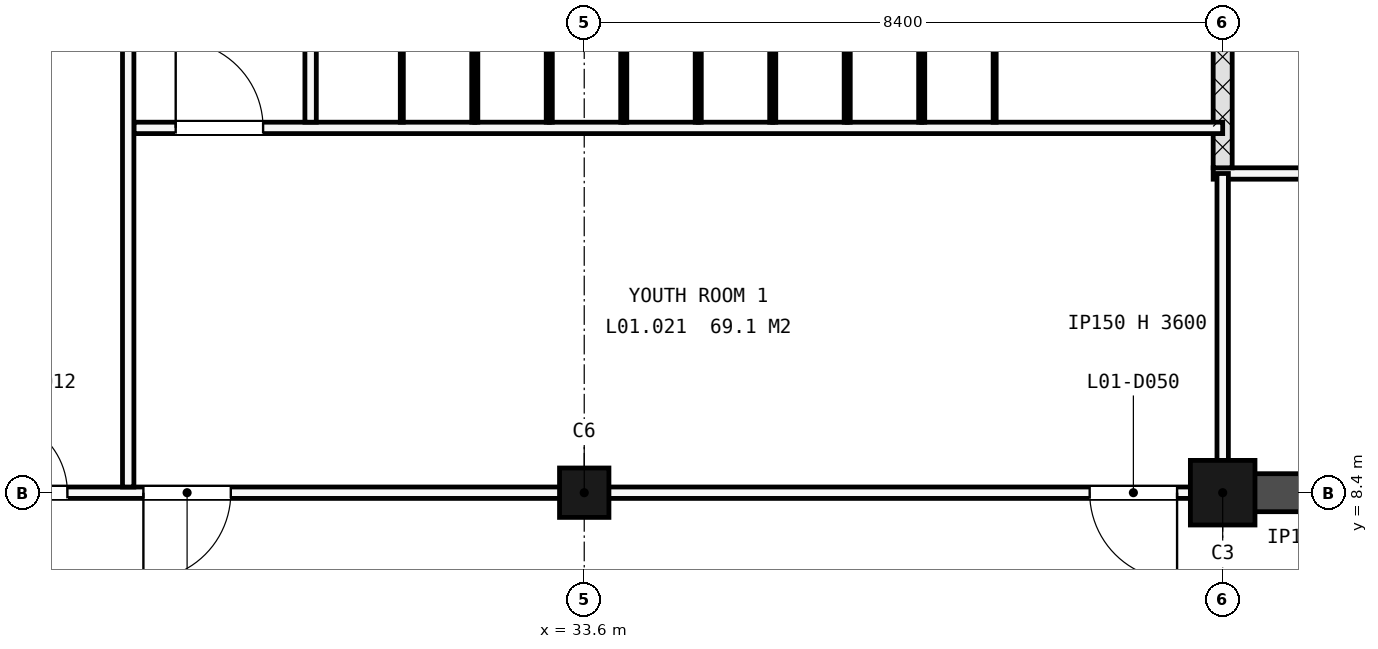
"""IFC4 building model, lengths in metres.
Left out: names, types, materials, properties, quantities, classifications, styles, units other than length and angle.
Written with IfcOpenShell. Run it as: python <this file> out.ifc"""

import sys

from ifc_helpers import new_model, si_unit, direction, frame, frame_2d, origin, origin_2d, place, context, subcontext, project, spatial, rectangle, extrude, element, fill, save


model = new_model("IFC4")
c1 = context("Model", 3, precision=1e-05, world=origin(), true_north=direction((0.0, 1.0)))
c2 = subcontext(c1, "Body", "Model", "MODEL_VIEW")
j1 = project(units=[si_unit("LENGTHUNIT", "METRE"), si_unit("PLANEANGLEUNIT", "RADIAN")], contexts=[c1])
p1 = place(None, origin())
s1 = spatial("IfcSite", under=j1, at=p1, CompositionType="ELEMENT")
p2 = place(p1, origin())
s2 = spatial("IfcBuilding", under=s1, at=p2, CompositionType="ELEMENT")
p3 = place(p2, frame((0.0, 0.0, 5.4)))
s3 = spatial("IfcBuildingStorey", under=s2, at=p3, CompositionType="ELEMENT", Elevation=5.4)
p4 = place(p3, frame((33.6, 8.4, -0.3), z_axis=(0.0, 0.0, 1.0), x_axis=(1.0, 0.0, 0.0)))
e1 = element("IfcColumn", 1, at=p4, inside=s3, PredefinedType="COLUMN", context=c2, shape_type="SweptSolid", body=[
    extrude(rectangle(XDim=0.65, YDim=0.65, at=origin_2d()), origin(), (0.0, 0.0, 1.0), 4.55),
])
p5 = place(p3, frame((42.0, 8.4, -0.3), z_axis=(0.0, 0.0, 1.0), x_axis=(1.0, 0.0, 0.0)))
e2 = element("IfcColumn", 2, at=p5, inside=s3, PredefinedType="COLUMN", context=c2, shape_type="SweptSolid", body=[
    extrude(rectangle(XDim=0.85, YDim=0.85, at=origin_2d()), origin(), (0.0, 0.0, 1.0), 4.55),
])
p6 = place(p3, frame((42.0, 8.4, -0.3), z_axis=(0.0, 0.0, 1.0), x_axis=(1.0, 0.0, 0.0)))
e3 = element("IfcWall", 3, at=p6, inside=s3, PredefinedType="SHEAR", context=c2, shape_type="SweptSolid", body=[
    extrude(rectangle(XDim=42.0, YDim=0.5, at=frame_2d((21.0, 0.0))), origin(), (0.0, 0.0, 1.0), 4.55),
])
p7 = place(p6, frame((20.6, 0.0, 0.3)))
e4 = element("IfcOpeningElement", 4, at=p7, cuts=e3, PredefinedType="OPENING", context=c2, shape_type="SweptSolid", body=[
    extrude(rectangle(XDim=1.0, YDim=2.1, at=frame_2d((0.5, 1.05))), frame((0.0, 0.26, 0.0), z_axis=(0.0, -1.0, 0.0), x_axis=(1.0, 0.0, 0.0)), (0.0, 0.0, 1.0), 0.52),
])
p8 = place(p3, frame((41.875, 12.6, -0.3), z_axis=(0.0, 0.0, 1.0), x_axis=(1.0, 0.0, 0.0)))
e5 = element("IfcWall", 5, at=p8, inside=s3, PredefinedType="PARTITIONING", context=c2, shape_type="SweptSolid", body=[
    extrude(rectangle(XDim=42.025, YDim=0.15, at=frame_2d((21.012, 0.0))), origin(), (0.0, 0.0, 1.0), 4.5),
])
p9 = place(p3, frame((42.0, 12.675, -0.3), z_axis=(0.0, 0.0, 1.0), x_axis=(0.0, 1.0, 0.0)))
e6 = element("IfcWall", 6, at=p9, inside=s3, PredefinedType="SOLIDWALL", context=c2, shape_type="SweptSolid", body=[
    extrude(rectangle(XDim=12.425, YDim=0.25, at=frame_2d((6.212, 0.0))), origin(), (0.0, 0.0, 1.0), 3.9),
])
p10 = place(p3, frame((25.2, 8.4, 0.0), z_axis=(0.0, 0.0, 1.0), x_axis=(1.0, 0.0, 0.0)))
e7 = element("IfcWall", 7, at=p10, inside=s3, PredefinedType="PARTITIONING", context=c2, shape_type="SweptSolid", body=[
    extrude(rectangle(XDim=16.875, YDim=0.15, at=frame_2d((8.438, 0.0))), origin(), (0.0, 0.0, 1.0), 3.5),
])
p11 = place(p10, frame((2.6, 0.0, 0.0)))
e8 = element("IfcOpeningElement", 8, at=p11, cuts=e7, PredefinedType="OPENING", context=c2, shape_type="SweptSolid", body=[
    extrude(rectangle(XDim=1.15, YDim=2.1, at=frame_2d((0.575, 1.05))), frame((0.0, 0.085, 0.0), z_axis=(0.0, -1.0, 0.0), x_axis=(1.0, 0.0, 0.0)), (0.0, 0.0, 1.0), 0.17),
])
p12 = place(p10, frame((15.05, 0.0, 0.0)))
e9 = element("IfcOpeningElement", 9, at=p12, cuts=e7, PredefinedType="OPENING", context=c2, shape_type="SweptSolid", body=[
    extrude(rectangle(XDim=1.15, YDim=2.1, at=frame_2d((0.575, 1.05))), frame((0.0, 0.085, 0.0), z_axis=(0.0, -1.0, 0.0), x_axis=(1.0, 0.0, 0.0)), (0.0, 0.0, 1.0), 0.17),
])
p13 = place(p10, frame((0.6, 0.0, 0.0)))
e10 = element("IfcOpeningElement", 10, at=p13, cuts=e7, PredefinedType="OPENING", context=c2, shape_type="SweptSolid", body=[
    extrude(rectangle(XDim=1.0, YDim=2.1, at=frame_2d((0.5, 1.05))), frame((0.0, 0.085, 0.0), z_axis=(0.0, -1.0, 0.0), x_axis=(1.0, 0.0, 0.0)), (0.0, 0.0, 1.0), 0.17),
])
p14 = place(p3, frame((27.675, 13.2, 0.0), z_axis=(0.0, 0.0, 1.0), x_axis=(1.0, 0.0, 0.0)))
e11 = element("IfcWall", 11, at=p14, inside=s3, PredefinedType="PARTITIONING", context=c2, shape_type="SweptSolid", body=[
    extrude(rectangle(XDim=14.325, YDim=0.15, at=frame_2d((7.163, 0.0))), origin(), (0.0, 0.0, 1.0), 4.2),
])
p15 = place(p14, frame((0.55, 0.0, 0.0)))
e12 = element("IfcOpeningElement", 12, at=p15, cuts=e11, PredefinedType="OPENING", context=c2, shape_type="SweptSolid", body=[
    extrude(rectangle(XDim=1.15, YDim=2.1, at=frame_2d((0.575, 1.05))), frame((0.0, 0.085, 0.0), z_axis=(0.0, -1.0, 0.0), x_axis=(1.0, 0.0, 0.0)), (0.0, 0.0, 1.0), 0.17),
])
p16 = place(p3, frame((27.6, 8.475, 0.0), z_axis=(0.0, 0.0, 1.0), x_axis=(0.0, 1.0, 0.0)))
e13 = element("IfcWall", 13, at=p16, inside=s3, PredefinedType="PARTITIONING", context=c2, shape_type="SweptSolid", body=[
    extrude(rectangle(XDim=16.825, YDim=0.15, at=frame_2d((8.413, 0.0))), origin(), (0.0, 0.0, 1.0), 4.2),
])
p17 = place(p16, frame((10.125, 0.0, 0.0)))
e14 = element("IfcOpeningElement", 14, at=p17, cuts=e13, PredefinedType="OPENING", context=c2, shape_type="SweptSolid", body=[
    extrude(rectangle(XDim=1.0, YDim=2.1, at=frame_2d((0.5, 1.05))), frame((0.0, 0.085, 0.0), z_axis=(0.0, -1.0, 0.0), x_axis=(1.0, 0.0, 0.0)), (0.0, 0.0, 1.0), 0.17),
])
p18 = place(p3, frame((30.0, 13.275, 0.0), z_axis=(0.0, 0.0, 1.0), x_axis=(0.0, 1.0, 0.0)))
e15 = element("IfcWall", 15, at=p18, inside=s3, PredefinedType="PARTITIONING", context=c2, shape_type="SweptSolid", body=[
    extrude(rectangle(XDim=11.825, YDim=0.15, at=frame_2d((5.913, 0.0))), origin(), (0.0, 0.0, 1.0), 4.2),
])
p19 = place(p18, frame((1.875, 0.0, 0.0)))
e16 = element("IfcOpeningElement", 16, at=p19, cuts=e15, PredefinedType="OPENING", context=c2, shape_type="SweptSolid", body=[
    extrude(rectangle(XDim=0.9, YDim=2.1, at=frame_2d((0.45, 1.05))), frame((0.0, 0.085, 0.0), z_axis=(0.0, -1.0, 0.0), x_axis=(1.0, 0.0, 0.0)), (0.0, 0.0, 1.0), 0.17),
])
p20 = place(p18, frame((6.575, 0.0, 0.0)))
e17 = element("IfcOpeningElement", 17, at=p20, cuts=e15, PredefinedType="OPENING", context=c2, shape_type="SweptSolid", body=[
    extrude(rectangle(XDim=0.9, YDim=2.1, at=frame_2d((0.45, 1.05))), frame((0.0, 0.085, 0.0), z_axis=(0.0, -1.0, 0.0), x_axis=(1.0, 0.0, 0.0)), (0.0, 0.0, 1.0), 0.17),
])
p21 = place(p18, frame((10.1, 0.0, 0.0)))
e18 = element("IfcOpeningElement", 18, at=p21, cuts=e15, PredefinedType="OPENING", context=c2, shape_type="SweptSolid", body=[
    extrude(rectangle(XDim=1.05, YDim=2.25, at=frame_2d((0.525, 1.125))), frame((0.0, 0.085, 0.0), z_axis=(0.0, -1.0, 0.0), x_axis=(1.0, 0.0, 0.0)), (0.0, 0.0, 1.0), 0.17),
])
p22 = place(p3, frame((42.0, 8.65, 0.0), z_axis=(0.0, 0.0, 1.0), x_axis=(0.0, 1.0, 0.0)))
e19 = element("IfcWall", 19, at=p22, inside=s3, PredefinedType="PARTITIONING", context=c2, shape_type="SweptSolid", body=[
    extrude(rectangle(XDim=3.95, YDim=0.15, at=frame_2d((1.975, 0.0))), origin(), (0.0, 0.0, 1.0), 3.6),
])
for number, where, z_axis, x_axis in (
    (20, (31.2, 13.275, 0.0), (0.0, 0.0, 1.0), (0.0, 1.0, 0.0)),
    (21, (32.14, 13.275, 0.0), (0.0, 0.0, 1.0), (0.0, 1.0, 0.0)),
    (22, (32.18, 13.275, 0.0), (0.0, 0.0, 1.0), (0.0, 1.0, 0.0)),
    (23, (33.12, 13.275, 0.0), (0.0, 0.0, 1.0), (0.0, 1.0, 0.0)),
    (24, (33.16, 13.275, 0.0), (0.0, 0.0, 1.0), (0.0, 1.0, 0.0)),
    (25, (34.1, 13.275, 0.0), (0.0, 0.0, 1.0), (0.0, 1.0, 0.0)),
    (26, (34.14, 13.275, 0.0), (0.0, 0.0, 1.0), (0.0, 1.0, 0.0)),
    (27, (35.08, 13.275, 0.0), (0.0, 0.0, 1.0), (0.0, 1.0, 0.0)),
    (28, (35.12, 13.275, 0.0), (0.0, 0.0, 1.0), (0.0, 1.0, 0.0)),
    (29, (36.06, 13.275, 0.0), (0.0, 0.0, 1.0), (0.0, 1.0, 0.0)),
    (30, (36.1, 13.275, 0.0), (0.0, 0.0, 1.0), (0.0, 1.0, 0.0)),
    (31, (37.04, 13.275, 0.0), (0.0, 0.0, 1.0), (0.0, 1.0, 0.0)),
    (32, (37.08, 13.275, 0.0), (0.0, 0.0, 1.0), (0.0, 1.0, 0.0)),
    (33, (38.02, 13.275, 0.0), (0.0, 0.0, 1.0), (0.0, 1.0, 0.0)),
    (34, (38.06, 13.275, 0.0), (0.0, 0.0, 1.0), (0.0, 1.0, 0.0)),
    (35, (39.0, 13.275, 0.0), (0.0, 0.0, 1.0), (0.0, 1.0, 0.0)),
):
    element("IfcWall", number, at=place(p3, frame(where, z_axis=z_axis, x_axis=x_axis)), inside=s3, PredefinedType="PARTITIONING", context=c2, shape_type="SweptSolid", body=[
        extrude(rectangle(XDim=1.595, YDim=0.04, at=frame_2d((0.798, 0.0))), origin(), (0.0, 0.0, 1.0), 2.0),
    ])
p23 = place(p11, origin())
e36 = element("IfcDoor", 36, at=p23, inside=s3, OperationType="SINGLE_SWING_LEFT", PredefinedType="DOOR", context=c2, shape_type="SweptSolid", body=[
    extrude(rectangle(XDim=1.15, YDim=2.1, at=frame_2d((0.575, 1.05))), frame((0.0, 0.025, 0.0), z_axis=(0.0, -1.0, 0.0), x_axis=(1.0, 0.0, 0.0)), (0.0, 0.0, 1.0), 0.05),
])
fill(e8, e36)
p24 = place(p12, origin())
e37 = element("IfcDoor", 37, at=p24, inside=s3, OperationType="SINGLE_SWING_RIGHT", PredefinedType="DOOR", context=c2, shape_type="SweptSolid", body=[
    extrude(rectangle(XDim=1.15, YDim=2.1, at=frame_2d((0.575, 1.05))), frame((0.0, 0.025, 0.0), z_axis=(0.0, -1.0, 0.0), x_axis=(1.0, 0.0, 0.0)), (0.0, 0.0, 1.0), 0.05),
])
fill(e9, e37)
p25 = place(p15, origin())
e38 = element("IfcDoor", 38, at=p25, inside=s3, OperationType="SINGLE_SWING_RIGHT", PredefinedType="DOOR", context=c2, shape_type="SweptSolid", body=[
    extrude(rectangle(XDim=1.15, YDim=2.1, at=frame_2d((0.575, 1.05))), frame((0.0, 0.025, 0.0), z_axis=(0.0, -1.0, 0.0), x_axis=(1.0, 0.0, 0.0)), (0.0, 0.0, 1.0), 0.05),
])
fill(e12, e38)
p26 = place(p13, origin())
e39 = element("IfcDoor", 39, at=p26, inside=s3, OperationType="SINGLE_SWING_RIGHT", PredefinedType="DOOR", context=c2, shape_type="SweptSolid", body=[
    extrude(rectangle(XDim=1.0, YDim=2.1, at=frame_2d((0.5, 1.05))), frame((0.0, 0.025, 0.0), z_axis=(0.0, -1.0, 0.0), x_axis=(1.0, 0.0, 0.0)), (0.0, 0.0, 1.0), 0.05),
])
fill(e10, e39)
save(model, sys.argv[1])
